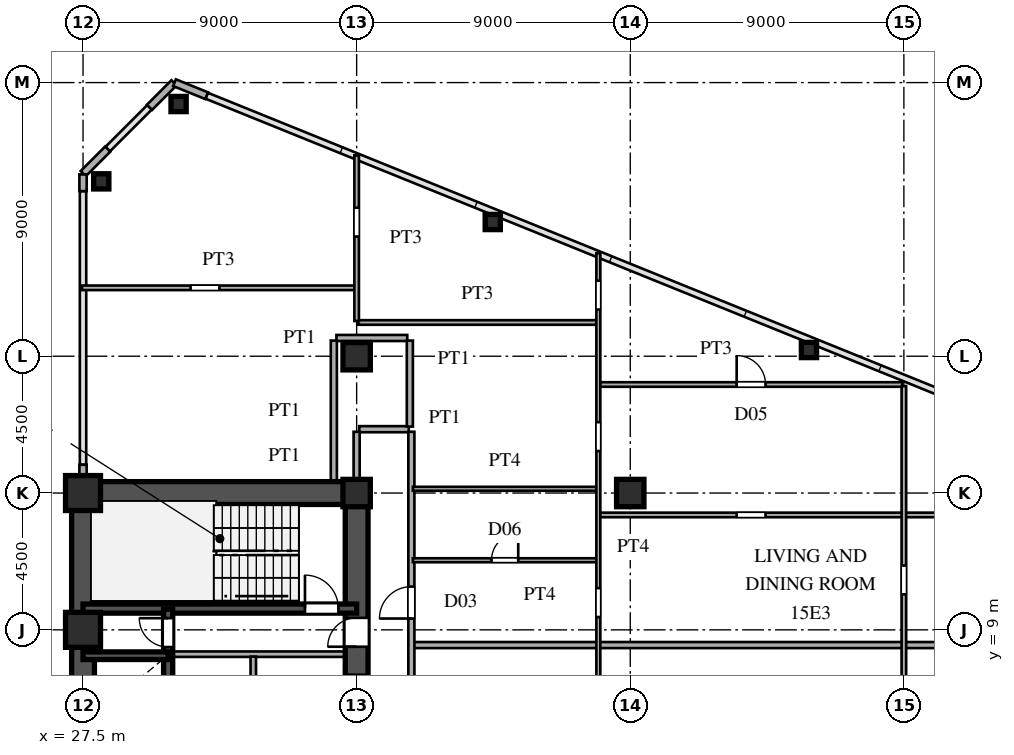
"""IFC4 building model, lengths in metres.
Left out: names, types, materials, properties, quantities, classifications, styles, units other than length and angle.
Written with IfcOpenShell. Run it as: python <this file> out.ifc"""

import sys

from ifc_helpers import new_model, si_unit, direction, frame, frame_2d, origin, origin_2d, place, context, subcontext, project, spatial, rectangle, hollow_rectangle, i_section, extrude, source, transform, mapped, element, fill, save


model = new_model("IFC4")
c1 = context("Model", 3, precision=1e-05, world=origin(), true_north=direction((0.0, 1.0)))
c2 = subcontext(c1, "Body", "Model", "MODEL_VIEW")
j1 = project(units=[si_unit("LENGTHUNIT", "METRE"), si_unit("PLANEANGLEUNIT", "RADIAN")], contexts=[c1])
p1 = place(None, origin())
s1 = spatial("IfcSite", under=j1, at=p1, CompositionType="ELEMENT")
p2 = place(p1, origin())
s2 = spatial("IfcBuilding", under=s1, at=p2, CompositionType="ELEMENT")
p3 = place(p2, frame((0.0, 0.0, 58.5)))
s3 = spatial("IfcBuildingStorey", under=s2, at=p3, CompositionType="ELEMENT", Elevation=58.5)
m1 = source(origin(), c2, "Body", "SweptSolid", [
    extrude(hollow_rectangle(XDim=1.15, YDim=1.15, WallThickness=0.048, at=origin_2d()), origin(), (0.0, 0.0, 1.0), 3.6),
])
for number, where, z_axis, x_axis in (
    (1, (27.5, 9.0, 0.0), (0.0, 0.0, 1.0), (1.0, 0.0, 0.0)),
    (2, (27.5, 13.5, 0.0), (0.0, 0.0, 1.0), (1.0, 0.0, 0.0)),
):
    element("IfcColumn", number, at=place(p3, frame(where, z_axis=z_axis, x_axis=x_axis)), inside=s3, PredefinedType="COLUMN", context=c2, shape_type="MappedRepresentation", body=[
        mapped(m1, transform((0.0, 0.0, 0.0), scale=1.0)),
    ])
m2 = source(origin(), c2, "Body", "SweptSolid", [
    extrude(i_section(OverallWidth=0.9, OverallDepth=0.9, WebThickness=0.036, FlangeThickness=0.055, at=origin_2d()), origin(), (0.0, 0.0, 1.0), 3.6),
])
for number, where, z_axis, x_axis in (
    (3, (36.5, 13.5, 0.0), (0.0, 0.0, 1.0), (1.0, 0.0, 0.0)),
    (4, (36.5, 18.0, 0.0), (0.0, 0.0, 1.0), (1.0, 0.0, 0.0)),
    (5, (45.5, 13.5, 0.0), (0.0, 0.0, 1.0), (1.0, 0.0, 0.0)),
):
    element("IfcColumn", number, at=place(p3, frame(where, z_axis=z_axis, x_axis=x_axis)), inside=s3, PredefinedType="COLUMN", context=c2, shape_type="MappedRepresentation", body=[
        mapped(m2, transform((0.0, 0.0, 0.0), scale=1.0)),
    ])
m3 = source(origin(), c2, "Body", "SweptSolid", [
    extrude(hollow_rectangle(XDim=0.5, YDim=0.5, WallThickness=0.02, at=origin_2d()), origin(), (0.0, 0.0, 1.0), 3.6),
])
for number, where, z_axis, x_axis in (
    (6, (30.643, 26.295, 0.0), (0.0, 0.0, 1.0), (1.0, 0.0, 0.0)),
    (7, (28.1, 23.751, 0.0), (0.0, 0.0, 1.0), (1.0, 0.0, 0.0)),
    (8, (40.977, 22.414, 0.0), (0.0, 0.0, 1.0), (1.0, 0.0, 0.0)),
    (9, (51.378, 18.204, 0.0), (0.0, 0.0, 1.0), (1.0, 0.0, 0.0)),
):
    element("IfcColumn", number, at=place(p3, frame(where, z_axis=z_axis, x_axis=x_axis)), inside=s3, PredefinedType="COLUMN", context=c2, shape_type="MappedRepresentation", body=[
        mapped(m3, transform((0.0, 0.0, 0.0), scale=1.0)),
    ])
p4 = place(p3, frame((31.566, 26.569, 0.0), z_axis=(0.0, 0.0, 1.0), x_axis=(-0.927007103665, 0.375043770452, 0.0)))
e10 = element("IfcWall", 10, at=p4, inside=s3, PredefinedType="SOLIDWALL", context=c2, shape_type="SweptSolid", body=[
    extrude(rectangle(XDim=1.14, YDim=0.24, at=frame_2d((0.57, 0.0))), origin(), (0.0, 0.0, 1.0), 3.38),
])
for number, where, z_axis, x_axis in (
    (11, (30.493, 26.993, 0.0), (0.0, 0.0, 1.0), (-0.707, -0.707, 0.0)),
    (12, (28.313, 24.813, 0.0), (0.0, 0.0, 1.0), (-0.707, -0.707, 0.0)),
):
    element("IfcWall", number, at=place(p3, frame(where, z_axis=z_axis, x_axis=x_axis)), inside=s3, PredefinedType="SOLIDWALL", context=c2, shape_type="SweptSolid", body=[
        extrude(rectangle(XDim=1.14, YDim=0.24, at=frame_2d((0.57, 0.0))), origin(), (0.0, 0.0, 1.0), 3.38),
    ])
p5 = place(p3, frame((27.5, 13.88, 0.0), z_axis=(0.0, 0.0, 1.0), x_axis=(0.0, 1.0, 0.0)))
e13 = element("IfcWall", 13, at=p5, inside=s3, PredefinedType="SOLIDWALL", context=c2, shape_type="SweptSolid", body=[
    extrude(rectangle(XDim=0.55, YDim=0.24, at=frame_2d((0.275, 0.0))), origin(), (0.0, 0.0, 1.0), 1.88),
])
p6 = place(p3, frame((27.5, 23.43, 0.0), z_axis=(0.0, 0.0, 1.0), x_axis=(0.0, 1.0, 0.0)))
e14 = element("IfcWall", 14, at=p6, inside=s3, PredefinedType="SOLIDWALL", context=c2, shape_type="SweptSolid", body=[
    extrude(rectangle(XDim=0.55, YDim=0.24, at=frame_2d((0.275, 0.0))), origin(), (0.0, 0.0, 1.0), 3.38),
])
p7 = place(p3, frame((27.5, 1.3, 0.0), z_axis=(0.0, 0.0, 1.0), x_axis=(0.0, 1.0, 0.0)))
e15 = element("IfcWall", 15, at=p7, inside=s3, PredefinedType="SHEAR", context=c2, shape_type="SweptSolid", body=[
    extrude(rectangle(XDim=12.2, YDim=0.75, at=frame_2d((6.1, 0.0))), origin(), (0.0, 0.0, 1.0), 3.38),
])
p8 = place(p3, frame((27.5, 13.5, 0.0), z_axis=(0.0, 0.0, 1.0), x_axis=(1.0, 0.0, 0.0)))
e16 = element("IfcWall", 16, at=p8, inside=s3, PredefinedType="SHEAR", context=c2, shape_type="SweptSolid", body=[
    extrude(rectangle(XDim=9.0, YDim=0.75, at=frame_2d((4.5, 0.0))), origin(), (0.0, 0.0, 1.0), 3.38),
])
p9 = place(p3, frame((36.5, 8.2, 0.0), z_axis=(0.0, 0.0, 1.0), x_axis=(0.0, 1.0, 0.0)))
e17 = element("IfcWall", 17, at=p9, inside=s3, PredefinedType="SHEAR", context=c2, shape_type="SweptSolid", body=[
    extrude(rectangle(XDim=5.45, YDim=0.75, at=frame_2d((2.725, 0.0))), origin(), (0.0, 0.0, 1.0), 3.38),
])
p10 = place(p9, frame((0.245, 0.0, 0.0)))
e18 = element("IfcOpeningElement", 18, at=p10, cuts=e17, PredefinedType="OPENING", context=c2, shape_type="SweptSolid", body=[
    extrude(rectangle(XDim=0.95, YDim=2.15, at=frame_2d((0.475, 1.075))), frame((0.0, 0.385, 0.0), z_axis=(0.0, -1.0, 0.0), x_axis=(1.0, 0.0, 0.0)), (0.0, 0.0, 1.0), 0.77),
])
p11 = place(p3, frame((36.5, 5.9, 0.0), z_axis=(0.0, 0.0, 1.0), x_axis=(0.0, 1.0, 0.0)))
e19 = element("IfcWall", 19, at=p11, inside=s3, PredefinedType="SHEAR", context=c2, shape_type="SweptSolid", body=[
    extrude(rectangle(XDim=2.3, YDim=0.75, at=frame_2d((1.15, 0.0))), origin(), (0.0, 0.0, 1.0), 3.38),
])
p12 = place(p11, frame((0.675, 0.0, 0.0)))
e20 = element("IfcOpeningElement", 20, at=p12, cuts=e19, PredefinedType="OPENING", context=c2, shape_type="SweptSolid", body=[
    extrude(rectangle(XDim=0.95, YDim=2.15, at=frame_2d((0.475, 1.075))), frame((0.0, 0.385, 0.0), z_axis=(0.0, -1.0, 0.0), x_axis=(1.0, 0.0, 0.0)), (0.0, 0.0, 1.0), 0.77),
])
p13 = place(p3, frame((27.5, 9.7, 0.0), z_axis=(0.0, 0.0, 1.0), x_axis=(1.0, 0.0, 0.0)))
e21 = element("IfcWall", 21, at=p13, inside=s3, PredefinedType="SHEAR", context=c2, shape_type="SweptSolid", body=[
    extrude(rectangle(XDim=9.0, YDim=0.3, at=frame_2d((4.5, 0.0))), origin(), (0.0, 0.0, 1.0), 3.38),
])
p14 = place(p13, frame((7.3, 0.0, 0.0)))
e22 = element("IfcOpeningElement", 22, at=p14, cuts=e21, PredefinedType="OPENING", context=c2, shape_type="SweptSolid", body=[
    extrude(rectangle(XDim=1.1, YDim=2.2, at=frame_2d((0.55, 1.1))), frame((0.0, 0.16, 0.0), z_axis=(0.0, -1.0, 0.0), x_axis=(1.0, 0.0, 0.0)), (0.0, 0.0, 1.0), 0.32),
])
p15 = place(p3, frame((27.5, 8.15, 0.0), z_axis=(0.0, 0.0, 1.0), x_axis=(1.0, 0.0, 0.0)))
e23 = element("IfcWall", 23, at=p15, inside=s3, PredefinedType="SHEAR", context=c2, shape_type="SweptSolid", body=[
    extrude(rectangle(XDim=2.8, YDim=0.25, at=frame_2d((1.4, 0.0))), origin(), (0.0, 0.0, 1.0), 3.38),
])
p16 = place(p3, frame((30.3, 5.9, 0.0), z_axis=(0.0, 0.0, 1.0), x_axis=(0.0, 1.0, 0.0)))
e24 = element("IfcWall", 24, at=p16, inside=s3, PredefinedType="SHEAR", context=c2, shape_type="SweptSolid", body=[
    extrude(rectangle(XDim=2.25, YDim=0.3, at=frame_2d((1.125, 0.0))), origin(), (0.0, 0.0, 1.0), 3.38),
])
p17 = place(p3, frame((30.3, 8.15, 0.0), z_axis=(0.0, 0.0, 1.0), x_axis=(0.0, 1.0, 0.0)))
e25 = element("IfcWall", 25, at=p17, inside=s3, PredefinedType="SHEAR", context=c2, shape_type="SweptSolid", body=[
    extrude(rectangle(XDim=1.53, YDim=0.3, at=frame_2d((0.765, 0.0))), origin(), (0.0, 0.0, 1.0), 3.38),
])
p18 = place(p17, frame((0.285, 0.0, 0.0)))
e26 = element("IfcOpeningElement", 26, at=p18, cuts=e25, PredefinedType="OPENING", context=c2, shape_type="SweptSolid", body=[
    extrude(rectangle(XDim=0.95, YDim=2.15, at=frame_2d((0.475, 1.075))), frame((0.0, 0.16, 0.0), z_axis=(0.0, -1.0, 0.0), x_axis=(1.0, 0.0, 0.0)), (0.0, 0.0, 1.0), 0.32),
])
p19 = place(p3, frame((30.45, 8.2, 0.0), z_axis=(0.0, 0.0, 1.0), x_axis=(1.0, 0.0, 0.0)))
e27 = element("IfcWall", 27, at=p19, inside=s3, PredefinedType="PARTITIONING", context=c2, shape_type="SweptSolid", body=[
    extrude(rectangle(XDim=5.7, YDim=0.18, at=frame_2d((2.85, 0.0))), origin(), (0.0, 0.0, 1.0), 3.38),
])
p20 = place(p3, frame((33.1, 1.38, 0.0), z_axis=(0.0, 0.0, 1.0), x_axis=(0.0, 1.0, 0.0)))
e28 = element("IfcWall", 28, at=p20, inside=s3, PredefinedType="PARTITIONING", context=c2, shape_type="SweptSolid", body=[
    extrude(rectangle(XDim=6.74, YDim=0.18, at=frame_2d((3.37, 0.0))), origin(), (0.0, 0.0, 1.0), 3.38),
])
p21 = place(p3, frame((38.38, 8.5, 0.0), z_axis=(0.0, 0.0, 1.0), x_axis=(1.0, 0.0, 0.0)))
e29 = element("IfcWall", 29, at=p21, inside=s3, PredefinedType="PARTITIONING", context=c2, shape_type="SweptSolid", body=[
    extrude(rectangle(XDim=34.125, YDim=0.2, at=frame_2d((17.062, 0.0))), origin(), (0.0, 0.0, 1.0), 3.38),
])
p22 = place(p3, frame((38.35, 11.29, 0.0), z_axis=(0.0, 0.0, 1.0), x_axis=(1.0, 0.0, 0.0)))
e30 = element("IfcWall", 30, at=p22, inside=s3, PredefinedType="PARTITIONING", context=c2, shape_type="SweptSolid", body=[
    extrude(rectangle(XDim=6.05, YDim=0.13, at=frame_2d((3.025, 0.0))), origin(), (0.0, 0.0, 1.0), 3.38),
])
p23 = place(p22, frame((2.585, 0.0, 0.0)))
e31 = element("IfcOpeningElement", 31, at=p23, cuts=e30, PredefinedType="OPENING", context=c2, shape_type="SweptSolid", body=[
    extrude(rectangle(XDim=0.88, YDim=2.1, at=frame_2d((0.44, 1.05))), frame((0.0, 0.075, 0.0), z_axis=(0.0, -1.0, 0.0), x_axis=(1.0, 0.0, 0.0)), (0.0, 0.0, 1.0), 0.15),
])
p24 = place(p3, frame((44.5, 12.78, 0.0), z_axis=(0.0, 0.0, 1.0), x_axis=(1.0, 0.0, 0.0)))
e32 = element("IfcWall", 32, at=p24, inside=s3, PredefinedType="PARTITIONING", context=c2, shape_type="SweptSolid", body=[
    extrude(rectangle(XDim=21.156, YDim=0.15, at=frame_2d((10.578, 0.0))), origin(), (0.0, 0.0, 1.0), 3.38),
])
p25 = place(p24, frame((4.5, 0.0, 0.0)))
e33 = element("IfcOpeningElement", 33, at=p25, cuts=e32, PredefinedType="OPENING", context=c2, shape_type="SweptSolid", body=[
    extrude(rectangle(XDim=0.95, YDim=2.15, at=frame_2d((0.475, 1.075))), frame((0.0, 0.085, 0.0), z_axis=(0.0, -1.0, 0.0), x_axis=(1.0, 0.0, 0.0)), (0.0, 0.0, 1.0), 0.17),
])
p26 = place(p24, frame((12.375, 0.0, 0.0)))
e34 = element("IfcOpeningElement", 34, at=p26, cuts=e32, PredefinedType="OPENING", context=c2, shape_type="SweptSolid", body=[
    extrude(rectangle(XDim=0.95, YDim=2.15, at=frame_2d((0.475, 1.075))), frame((0.0, 0.085, 0.0), z_axis=(0.0, -1.0, 0.0), x_axis=(1.0, 0.0, 0.0)), (0.0, 0.0, 1.0), 0.17),
])
p27 = place(p3, frame((38.35, 13.64, 0.0), z_axis=(0.0, 0.0, 1.0), x_axis=(1.0, 0.0, 0.0)))
e35 = element("IfcWall", 35, at=p27, inside=s3, PredefinedType="PARTITIONING", context=c2, shape_type="SweptSolid", body=[
    extrude(rectangle(XDim=6.05, YDim=0.13, at=frame_2d((3.025, 0.0))), origin(), (0.0, 0.0, 1.0), 2.68),
])
p28 = place(p3, frame((36.585, 15.6, 0.0), z_axis=(0.0, 0.0, 1.0), x_axis=(1.0, 0.0, 0.0)))
e36 = element("IfcWall", 36, at=p28, inside=s3, PredefinedType="PARTITIONING", context=c2, shape_type="SweptSolid", body=[
    extrude(rectangle(XDim=1.63, YDim=0.2, at=frame_2d((0.815, 0.0))), origin(), (0.0, 0.0, 1.0), 3.38),
])
p29 = place(p3, frame((44.5, 17.07, 0.0), z_axis=(0.0, 0.0, 1.0), x_axis=(1.0, 0.0, 0.0)))
e37 = element("IfcWall", 37, at=p29, inside=s3, PredefinedType="PARTITIONING", context=c2, shape_type="SweptSolid", body=[
    extrude(rectangle(XDim=9.95, YDim=0.15, at=frame_2d((4.975, 0.0))), origin(), (0.0, 0.0, 1.0), 3.38),
])
p30 = place(p29, frame((4.5, 0.0, 0.0)))
e38 = element("IfcOpeningElement", 38, at=p30, cuts=e37, PredefinedType="OPENING", context=c2, shape_type="SweptSolid", body=[
    extrude(rectangle(XDim=0.95, YDim=2.15, at=frame_2d((0.475, 1.075))), frame((0.0, 0.085, 0.0), z_axis=(0.0, -1.0, 0.0), x_axis=(1.0, 0.0, 0.0)), (0.0, 0.0, 1.0), 0.17),
])
p31 = place(p3, frame((35.835, 18.6, 0.0), z_axis=(0.0, 0.0, 1.0), x_axis=(1.0, 0.0, 0.0)))
e39 = element("IfcWall", 39, at=p31, inside=s3, PredefinedType="PARTITIONING", context=c2, shape_type="SweptSolid", body=[
    extrude(rectangle(XDim=2.33, YDim=0.2, at=frame_2d((1.165, 0.0))), origin(), (0.0, 0.0, 1.0), 3.38),
])
p32 = place(p3, frame((36.55, 19.11, 0.0), z_axis=(0.0, 0.0, 1.0), x_axis=(1.0, 0.0, 0.0)))
e40 = element("IfcWall", 40, at=p32, inside=s3, PredefinedType="PARTITIONING", context=c2, shape_type="SweptSolid", body=[
    extrude(rectangle(XDim=7.85, YDim=0.15, at=frame_2d((3.925, 0.0))), origin(), (0.0, 0.0, 1.0), 3.38),
])
p33 = place(p3, frame((27.465, 20.25, 0.0), z_axis=(0.0, 0.0, 1.0), x_axis=(1.0, 0.0, 0.0)))
e41 = element("IfcWall", 41, at=p33, inside=s3, PredefinedType="PARTITIONING", context=c2, shape_type="SweptSolid", body=[
    extrude(rectangle(XDim=8.985, YDim=0.15, at=frame_2d((4.492, 0.0))), origin(), (0.0, 0.0, 1.0), 3.38),
])
p34 = place(p33, frame((3.573, 0.0, 0.0)))
e42 = element("IfcOpeningElement", 42, at=p34, cuts=e41, PredefinedType="OPENING", context=c2, shape_type="SweptSolid", body=[
    extrude(rectangle(XDim=0.95, YDim=2.15, at=frame_2d((0.475, 1.075))), frame((0.0, 0.085, 0.0), z_axis=(0.0, -1.0, 0.0), x_axis=(1.0, 0.0, 0.0)), (0.0, 0.0, 1.0), 0.17),
])
p35 = place(p3, frame((35.75, 13.88, 0.0), z_axis=(0.0, 0.0, 1.0), x_axis=(0.0, 1.0, 0.0)))
e43 = element("IfcWall", 43, at=p35, inside=s3, PredefinedType="PARTITIONING", context=c2, shape_type="SweptSolid", body=[
    extrude(rectangle(XDim=4.635, YDim=0.2, at=frame_2d((2.317, 0.0))), origin(), (0.0, 0.0, 1.0), 3.38),
])
p36 = place(p3, frame((36.5, 13.88, 0.0), z_axis=(0.0, 0.0, 1.0), x_axis=(0.0, 1.0, 0.0)))
e44 = element("IfcWall", 44, at=p36, inside=s3, PredefinedType="PARTITIONING", context=c2, shape_type="SweptSolid", body=[
    extrude(rectangle(XDim=1.635, YDim=0.2, at=frame_2d((0.817, 0.0))), origin(), (0.0, 0.0, 1.0), 1.38),
])
p37 = place(p3, frame((36.5, 19.158, 0.0), z_axis=(0.0, 0.0, 1.0), x_axis=(0.0, 1.0, 0.0)))
e45 = element("IfcWall", 45, at=p37, inside=s3, PredefinedType="PARTITIONING", context=c2, shape_type="SweptSolid", body=[
    extrude(rectangle(XDim=5.448, YDim=0.15, at=frame_2d((2.724, 0.0))), origin(), (0.0, 0.0, 1.0), 3.38),
])
p38 = place(p37, frame((2.778, 0.0, 0.0)))
e46 = element("IfcOpeningElement", 46, at=p38, cuts=e45, PredefinedType="OPENING", context=c2, shape_type="SweptSolid", body=[
    extrude(rectangle(XDim=0.95, YDim=2.15, at=frame_2d((0.475, 1.075))), frame((0.0, 0.085, 0.0), z_axis=(0.0, -1.0, 0.0), x_axis=(1.0, 0.0, 0.0)), (0.0, 0.0, 1.0), 0.17),
])
p39 = place(p3, frame((38.25, 15.685, 0.0), z_axis=(0.0, 0.0, 1.0), x_axis=(0.0, 1.0, 0.0)))
e47 = element("IfcWall", 47, at=p39, inside=s3, PredefinedType="PARTITIONING", context=c2, shape_type="SweptSolid", body=[
    extrude(rectangle(XDim=2.83, YDim=0.2, at=frame_2d((1.415, 0.0))), origin(), (0.0, 0.0, 1.0), 3.38),
])
p40 = place(p3, frame((38.3, -15.515, 0.0), z_axis=(0.0, 0.0, 1.0), x_axis=(0.0, 1.0, 0.0)))
e48 = element("IfcWall", 48, at=p40, inside=s3, PredefinedType="PARTITIONING", context=c2, shape_type="SweptSolid", body=[
    extrude(rectangle(XDim=31.03, YDim=0.2, at=frame_2d((15.515, 0.0))), origin(), (0.0, 0.0, 1.0), 3.38),
])
p41 = place(p40, frame((4.44, 0.0, 0.0)))
e49 = element("IfcOpeningElement", 49, at=p41, cuts=e48, PredefinedType="OPENING", context=c2, shape_type="SweptSolid", body=[
    extrude(rectangle(XDim=1.05, YDim=2.25, at=frame_2d((0.525, 1.125))), frame((0.0, 0.11, 0.0), z_axis=(0.0, -1.0, 0.0), x_axis=(1.0, 0.0, 0.0)), (0.0, 0.0, 1.0), 0.22),
])
p42 = place(p40, frame((16.28, 0.0, 0.0)))
e50 = element("IfcOpeningElement", 50, at=p42, cuts=e48, PredefinedType="OPENING", context=c2, shape_type="SweptSolid", body=[
    extrude(rectangle(XDim=1.05, YDim=2.25, at=frame_2d((0.525, 1.125))), frame((0.0, 0.11, 0.0), z_axis=(0.0, -1.0, 0.0), x_axis=(1.0, 0.0, 0.0)), (0.0, 0.0, 1.0), 0.22),
])
p43 = place(p40, frame((24.887, 0.0, 0.0)))
e51 = element("IfcOpeningElement", 51, at=p43, cuts=e48, PredefinedType="OPENING", context=c2, shape_type="SweptSolid", body=[
    extrude(rectangle(XDim=1.05, YDim=2.25, at=frame_2d((0.525, 1.125))), frame((0.0, 0.11, 0.0), z_axis=(0.0, -1.0, 0.0), x_axis=(1.0, 0.0, 0.0)), (0.0, 0.0, 1.0), 0.22),
])
p44 = place(p3, frame((44.45, 4.352, 0.0), z_axis=(0.0, 0.0, 1.0), x_axis=(0.0, 1.0, 0.0)))
e52 = element("IfcWall", 52, at=p44, inside=s3, PredefinedType="PARTITIONING", context=c2, shape_type="SweptSolid", body=[
    extrude(rectangle(XDim=17.037, YDim=0.13, at=frame_2d((8.519, 0.0))), origin(), (0.0, 0.0, 1.0), 3.38),
])
p45 = place(p44, frame((5.071, 0.0, 0.0)))
e53 = element("IfcOpeningElement", 53, at=p45, cuts=e52, PredefinedType="OPENING", context=c2, shape_type="SweptSolid", body=[
    extrude(rectangle(XDim=0.95, YDim=2.15, at=frame_2d((0.475, 1.075))), frame((0.0, 0.075, 0.0), z_axis=(0.0, -1.0, 0.0), x_axis=(1.0, 0.0, 0.0)), (0.0, 0.0, 1.0), 0.15),
])
p46 = place(p44, frame((10.53, 0.0, 0.0)))
e54 = element("IfcOpeningElement", 54, at=p46, cuts=e52, PredefinedType="OPENING", context=c2, shape_type="SweptSolid", body=[
    extrude(rectangle(XDim=0.95, YDim=2.15, at=frame_2d((0.475, 1.075))), frame((0.0, 0.075, 0.0), z_axis=(0.0, -1.0, 0.0), x_axis=(1.0, 0.0, 0.0)), (0.0, 0.0, 1.0), 0.15),
])
p47 = place(p44, frame((15.182, 0.0, 0.0)))
e55 = element("IfcOpeningElement", 55, at=p47, cuts=e52, PredefinedType="OPENING", context=c2, shape_type="SweptSolid", body=[
    extrude(rectangle(XDim=0.95, YDim=2.15, at=frame_2d((0.475, 1.075))), frame((0.0, 0.075, 0.0), z_axis=(0.0, -1.0, 0.0), x_axis=(1.0, 0.0, 0.0)), (0.0, 0.0, 1.0), 0.15),
])
p48 = place(p3, frame((54.5, -5.45, 0.0), z_axis=(0.0, 0.0, 1.0), x_axis=(0.0, 1.0, 0.0)))
e56 = element("IfcWall", 56, at=p48, inside=s3, PredefinedType="PARTITIONING", context=c2, shape_type="SweptSolid", body=[
    extrude(rectangle(XDim=22.469, YDim=0.15, at=frame_2d((11.234, 0.0))), origin(), (0.0, 0.0, 1.0), 2.68),
])
p49 = place(p48, frame((6.475, 0.0, 0.0)))
e57 = element("IfcOpeningElement", 57, at=p49, cuts=e56, PredefinedType="OPENING", context=c2, shape_type="SweptSolid", body=[
    extrude(rectangle(XDim=0.95, YDim=2.15, at=frame_2d((0.475, 1.075))), frame((0.0, 0.085, 0.0), z_axis=(0.0, -1.0, 0.0), x_axis=(1.0, 0.0, 0.0)), (0.0, 0.0, 1.0), 0.17),
])
p50 = place(p48, frame((15.617, 0.0, 0.0)))
e58 = element("IfcOpeningElement", 58, at=p50, cuts=e56, PredefinedType="OPENING", context=c2, shape_type="SweptSolid", body=[
    extrude(rectangle(XDim=0.95, YDim=2.15, at=frame_2d((0.475, 1.075))), frame((0.0, 0.085, 0.0), z_axis=(0.0, -1.0, 0.0), x_axis=(1.0, 0.0, 0.0)), (0.0, 0.0, 1.0), 0.17),
])
m4 = source(origin(), c2, "Body", "SweptSolid", [
    extrude(rectangle(XDim=0.95, YDim=2.15, at=frame_2d((0.475, 1.075))), frame((0.0, 0.025, 0.0), z_axis=(0.0, -1.0, 0.0), x_axis=(1.0, 0.0, 0.0)), (0.0, 0.0, 1.0), 0.05),
])
p51 = place(p10, origin())
e59 = element("IfcDoor", 59, at=p51, inside=s3, OperationType="SINGLE_SWING_LEFT", PredefinedType="DOOR", context=c2, shape_type="MappedRepresentation", body=[
    mapped(m4, transform((0.0, 0.0, 0.0), scale=1.0)),
])
fill(e18, e59)
p52 = place(p12, origin())
e60 = element("IfcDoor", 60, at=p52, inside=s3, OperationType="SINGLE_SWING_LEFT", PredefinedType="DOOR", context=c2, shape_type="MappedRepresentation", body=[
    mapped(m4, transform((0.0, 0.0, 0.0), scale=1.0)),
])
fill(e20, e60)
m5 = source(origin(), c2, "Body", "SweptSolid", [
    extrude(rectangle(XDim=1.1, YDim=2.2, at=frame_2d((0.55, 1.1))), frame((0.0, 0.025, 0.0), z_axis=(0.0, -1.0, 0.0), x_axis=(1.0, 0.0, 0.0)), (0.0, 0.0, 1.0), 0.05),
])
p53 = place(p14, origin())
e61 = element("IfcDoor", 61, at=p53, inside=s3, OperationType="SINGLE_SWING_LEFT", PredefinedType="DOOR", context=c2, shape_type="MappedRepresentation", body=[
    mapped(m5, transform((0.0, 0.0, 0.0), scale=1.0)),
])
fill(e22, e61)
p54 = place(p18, origin())
e62 = element("IfcDoor", 62, at=p54, inside=s3, OperationType="SINGLE_SWING_RIGHT", PredefinedType="DOOR", context=c2, shape_type="MappedRepresentation", body=[
    mapped(m4, transform((0.0, 0.0, 0.0), scale=1.0)),
])
fill(e26, e62)
m6 = source(origin(), c2, "Body", "SweptSolid", [
    extrude(rectangle(XDim=0.88, YDim=2.1, at=frame_2d((0.44, 1.05))), frame((0.0, 0.025, 0.0), z_axis=(0.0, -1.0, 0.0), x_axis=(1.0, 0.0, 0.0)), (0.0, 0.0, 1.0), 0.05),
])
p55 = place(p23, origin())
e63 = element("IfcDoor", 63, at=p55, inside=s3, OperationType="SINGLE_SWING_RIGHT", PredefinedType="DOOR", context=c2, shape_type="MappedRepresentation", body=[
    mapped(m6, transform((0.0, 0.0, 0.0), scale=1.0)),
])
fill(e31, e63)
m7 = source(origin(), c2, "Body", "SweptSolid", [
    extrude(rectangle(XDim=0.95, YDim=2.15, at=frame_2d((0.475, 1.075))), frame((0.0, 0.025, 0.0), z_axis=(0.0, -1.0, 0.0), x_axis=(1.0, 0.0, 0.0)), (0.0, 0.0, 1.0), 0.05),
])
p56 = place(p30, origin())
e64 = element("IfcDoor", 64, at=p56, inside=s3, OperationType="SINGLE_SWING_LEFT", PredefinedType="DOOR", context=c2, shape_type="MappedRepresentation", body=[
    mapped(m7, transform((0.0, 0.0, 0.0), scale=1.0)),
])
fill(e38, e64)
m8 = source(origin(), c2, "Body", "SweptSolid", [
    extrude(rectangle(XDim=1.05, YDim=2.25, at=frame_2d((0.525, 1.125))), frame((0.0, 0.025, 0.0), z_axis=(0.0, -1.0, 0.0), x_axis=(1.0, 0.0, 0.0)), (0.0, 0.0, 1.0), 0.05),
])
p57 = place(p43, origin())
e65 = element("IfcDoor", 65, at=p57, inside=s3, OperationType="SINGLE_SWING_LEFT", PredefinedType="DOOR", context=c2, shape_type="MappedRepresentation", body=[
    mapped(m8, transform((0.0, 0.0, 0.0), scale=1.0)),
])
fill(e51, e65)
save(model, sys.argv[1])
